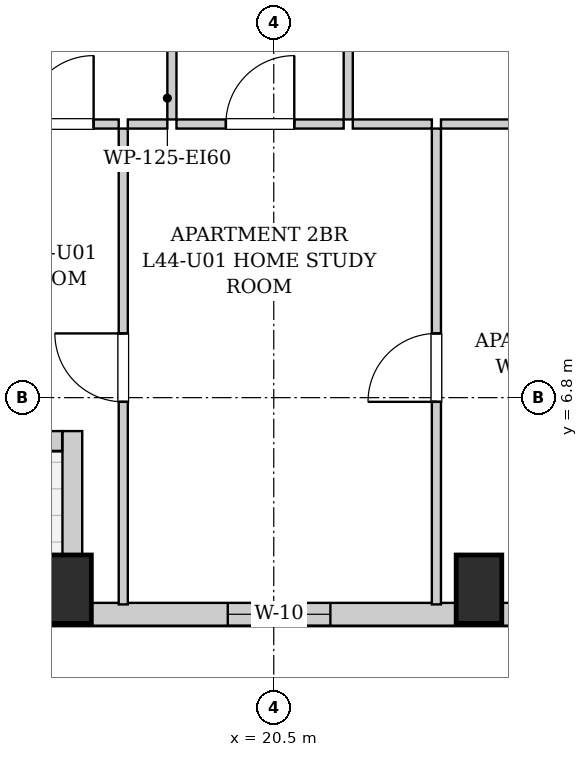
"""IFC4 building model, lengths in metres.
Left out: names, types, materials, properties, quantities, classifications, styles, units other than length and angle.
Written with IfcOpenShell. Run it as: python <this file> out.ifc"""

import sys

from ifc_helpers import new_model, si_unit, direction, frame, frame_2d, origin, origin_2d, place, context, subcontext, project, spatial, rectangle, extrude, element, fill, save


model = new_model("IFC4")
c1 = context("Model", 3, precision=1e-05, world=origin(), true_north=direction((0.0, 1.0)))
c2 = subcontext(c1, "Body", "Model", "MODEL_VIEW")
j1 = project(units=[si_unit("LENGTHUNIT", "METRE"), si_unit("PLANEANGLEUNIT", "RADIAN")], contexts=[c1])
p1 = place(None, origin())
s1 = spatial("IfcSite", under=j1, at=p1, CompositionType="ELEMENT")
p2 = place(p1, origin())
s2 = spatial("IfcBuilding", under=s1, at=p2, CompositionType="ELEMENT")
p3 = place(p2, frame((0.0, 0.0, 153.65)))
s3 = spatial("IfcBuildingStorey", under=s2, at=p3, CompositionType="ELEMENT", Elevation=153.65)
for number, where, z_axis, x_axis in (
    (1, (17.8, 4.28, 0.0), (0.0, 0.0, 1.0), (1.0, 0.0, 0.0)),
    (2, (23.2, 4.28, 0.0), (0.0, 0.0, 1.0), (1.0, 0.0, 0.0)),
):
    element("IfcColumn", number, at=place(p3, frame(where, z_axis=z_axis, x_axis=x_axis)), inside=s3, PredefinedType="COLUMN", context=c2, shape_type="SweptSolid", body=[
        extrude(rectangle(XDim=0.6, YDim=0.9, at=origin_2d()), origin(), (0.0, 0.0, 1.0), 3.25),
    ])
p4 = place(p3, frame((37.8, 3.95, 0.0), z_axis=(0.0, 0.0, 1.0), x_axis=(-1.0, 0.0, 0.0)))
e3 = element("IfcWall", 3, at=p4, inside=s3, PredefinedType="SOLIDWALL", context=c2, shape_type="SweptSolid", body=[
    extrude(rectangle(XDim=19.95, YDim=0.3, at=frame_2d((9.975, 0.0))), origin(), (0.0, 0.0, 1.0), 2.99),
])
p5 = place(p4, frame((16.555, 0.0, 0.55)))
e4 = element("IfcOpeningElement", 4, at=p5, cuts=e3, PredefinedType="OPENING", context=c2, shape_type="SweptSolid", body=[
    extrude(rectangle(XDim=1.35, YDim=1.2, at=frame_2d((0.675, 0.6))), frame((0.0, 0.16, 0.0), z_axis=(0.0, -1.0, 0.0), x_axis=(1.0, 0.0, 0.0)), (0.0, 0.0, 1.0), 0.32),
])
p6 = place(p4, frame((7.788, 0.0, 0.55)))
e5 = element("IfcOpeningElement", 5, at=p6, cuts=e3, PredefinedType="OPENING", context=c2, shape_type="SweptSolid", body=[
    extrude(rectangle(XDim=1.35, YDim=1.2, at=frame_2d((0.675, 0.6))), frame((0.0, 0.16, 0.0), z_axis=(0.0, -1.0, 0.0), x_axis=(1.0, 0.0, 0.0)), (0.0, 0.0, 1.0), 0.32),
])
p7 = place(p4, frame((5.06, 0.0, 0.55)))
e6 = element("IfcOpeningElement", 6, at=p7, cuts=e3, PredefinedType="OPENING", context=c2, shape_type="SweptSolid", body=[
    extrude(rectangle(XDim=1.35, YDim=1.2, at=frame_2d((0.675, 0.6))), frame((0.0, 0.16, 0.0), z_axis=(0.0, -1.0, 0.0), x_axis=(1.0, 0.0, 0.0)), (0.0, 0.0, 1.0), 0.32),
])
p8 = place(p3, frame((17.85, 3.96, 0.0), z_axis=(0.0, 0.0, 1.0), x_axis=(0.0, 1.0, 0.0)))
e7 = element("IfcWall", 7, at=p8, inside=s3, PredefinedType="SOLIDWALL", context=c2, shape_type="SweptSolid", body=[
    extrude(rectangle(XDim=2.4, YDim=0.26, at=frame_2d((1.2, 0.0))), origin(), (0.0, 0.0, 1.0), 2.442),
])
p9 = place(p3, frame((17.716, 6.23, 0.0), z_axis=(0.0, 0.0, 1.0), x_axis=(-1.0, 0.0, 0.0)))
e8 = element("IfcWall", 8, at=p9, inside=s3, PredefinedType="SOLIDWALL", context=c2, shape_type="SweptSolid", body=[
    extrude(rectangle(XDim=4.332, YDim=0.26, at=frame_2d((2.166, 0.0))), origin(), (0.0, 0.0, 1.0), 2.99),
])
p10 = place(p9, frame((1.616, 0.0, 0.0)))
e9 = element("IfcOpeningElement", 9, at=p10, cuts=e8, PredefinedType="OPENING", context=c2, shape_type="SweptSolid", body=[
    extrude(rectangle(XDim=1.1, YDim=2.0, at=frame_2d((0.55, 1.0))), frame((0.0, 0.14, 0.0), z_axis=(0.0, -1.0, 0.0), x_axis=(1.0, 0.0, 0.0)), (0.0, 0.0, 1.0), 0.28),
])
p11 = place(p9, frame((0.606, 0.0, 0.55)))
e10 = element("IfcOpeningElement", 10, at=p11, cuts=e8, PredefinedType="OPENING", context=c2, shape_type="SweptSolid", body=[
    extrude(rectangle(XDim=0.85, YDim=1.2, at=frame_2d((0.425, 0.6))), frame((0.0, 0.14, 0.0), z_axis=(0.0, -1.0, 0.0), x_axis=(1.0, 0.0, 0.0)), (0.0, 0.0, 1.0), 0.28),
])
p12 = place(p3, frame((19.16, 10.46, 0.0), z_axis=(0.0, 0.0, 1.0), x_axis=(0.0, 1.0, 0.0)))
e11 = element("IfcWall", 11, at=p12, inside=s3, PredefinedType="PARTITIONING", context=c2, shape_type="SweptSolid", body=[
    extrude(rectangle(XDim=2.85, YDim=0.12, at=frame_2d((1.425, 0.0))), origin(), (0.0, 0.0, 1.0), 2.99),
])
p13 = place(p12, frame((0.975, 0.0, 0.0)))
e12 = element("IfcOpeningElement", 12, at=p13, cuts=e11, PredefinedType="OPENING", context=c2, shape_type="SweptSolid", body=[
    extrude(rectangle(XDim=0.9, YDim=2.05, at=frame_2d((0.45, 1.025))), frame((0.0, 0.07, 0.0), z_axis=(0.0, -1.0, 0.0), x_axis=(1.0, 0.0, 0.0)), (0.0, 0.0, 1.0), 0.14),
])
p14 = place(p3, frame((16.9, 10.4, 0.0), z_axis=(0.0, 0.0, 1.0), x_axis=(1.0, 0.0, 0.0)))
e13 = element("IfcWall", 13, at=p14, inside=s3, PredefinedType="PARTITIONING", context=c2, shape_type="SweptSolid", body=[
    extrude(rectangle(XDim=1.56, YDim=0.12, at=frame_2d((0.78, 0.0))), origin(), (0.0, 0.0, 1.0), 2.99),
])
p15 = place(p14, frame((0.33, 0.0, 0.0)))
e14 = element("IfcOpeningElement", 14, at=p15, cuts=e13, PredefinedType="OPENING", context=c2, shape_type="SweptSolid", body=[
    extrude(rectangle(XDim=0.9, YDim=2.05, at=frame_2d((0.45, 1.025))), frame((0.0, 0.07, 0.0), z_axis=(0.0, -1.0, 0.0), x_axis=(1.0, 0.0, 0.0)), (0.0, 0.0, 1.0), 0.14),
])
p16 = place(p3, frame((18.58, 10.4, 0.0), z_axis=(0.0, 0.0, 1.0), x_axis=(1.0, 0.0, 0.0)))
e15 = element("IfcWall", 15, at=p16, inside=s3, PredefinedType="PARTITIONING", context=c2, shape_type="SweptSolid", body=[
    extrude(rectangle(XDim=0.52, YDim=0.12, at=frame_2d((0.26, 0.0))), origin(), (0.0, 0.0, 1.0), 2.99),
])
p17 = place(p3, frame((21.48, 10.46, 0.0), z_axis=(0.0, 0.0, 1.0), x_axis=(0.0, 1.0, 0.0)))
e16 = element("IfcWall", 16, at=p17, inside=s3, PredefinedType="PARTITIONING", context=c2, shape_type="SweptSolid", body=[
    extrude(rectangle(XDim=2.85, YDim=0.12, at=frame_2d((1.425, 0.0))), origin(), (0.0, 0.0, 1.0), 2.99),
])
p18 = place(p17, frame((0.975, 0.0, 0.0)))
e17 = element("IfcOpeningElement", 17, at=p18, cuts=e16, PredefinedType="OPENING", context=c2, shape_type="SweptSolid", body=[
    extrude(rectangle(XDim=0.9, YDim=2.05, at=frame_2d((0.45, 1.025))), frame((0.0, 0.07, 0.0), z_axis=(0.0, -1.0, 0.0), x_axis=(1.0, 0.0, 0.0)), (0.0, 0.0, 1.0), 0.14),
])
p19 = place(p3, frame((19.22, 10.4, 0.0), z_axis=(0.0, 0.0, 1.0), x_axis=(1.0, 0.0, 0.0)))
e18 = element("IfcWall", 18, at=p19, inside=s3, PredefinedType="PARTITIONING", context=c2, shape_type="SweptSolid", body=[
    extrude(rectangle(XDim=2.2, YDim=0.12, at=frame_2d((1.1, 0.0))), origin(), (0.0, 0.0, 1.0), 2.99),
])
p20 = place(p19, frame((0.65, 0.0, 0.0)))
e19 = element("IfcOpeningElement", 19, at=p20, cuts=e18, PredefinedType="OPENING", context=c2, shape_type="SweptSolid", body=[
    extrude(rectangle(XDim=0.9, YDim=2.05, at=frame_2d((0.45, 1.025))), frame((0.0, 0.07, 0.0), z_axis=(0.0, -1.0, 0.0), x_axis=(1.0, 0.0, 0.0)), (0.0, 0.0, 1.0), 0.14),
])
for number, where, z_axis, x_axis in (
    (20, (21.54, 10.4, 0.0), (0.0, 0.0, 1.0), (1.0, 0.0, 0.0)),
    (21, (22.7, 10.4, 0.0), (0.0, 0.0, 1.0), (1.0, 0.0, 0.0)),
):
    element("IfcWall", number, at=place(p3, frame(where, z_axis=z_axis, x_axis=x_axis)), inside=s3, PredefinedType="PARTITIONING", context=c2, shape_type="SweptSolid", body=[
        extrude(rectangle(XDim=1.04, YDim=0.12, at=frame_2d((0.52, 0.0))), origin(), (0.0, 0.0, 1.0), 2.99),
    ])
p21 = place(p3, frame((18.52, 4.08, 0.0), z_axis=(0.0, 0.0, 1.0), x_axis=(0.0, 1.0, 0.0)))
e22 = element("IfcWall", 22, at=p21, inside=s3, PredefinedType="PARTITIONING", context=c2, shape_type="SweptSolid", body=[
    extrude(rectangle(XDim=6.26, YDim=0.12, at=frame_2d((3.13, 0.0))), origin(), (0.0, 0.0, 1.0), 2.99),
])
p22 = place(p21, frame((2.665, 0.0, 0.0)))
e23 = element("IfcOpeningElement", 23, at=p22, cuts=e22, PredefinedType="OPENING", context=c2, shape_type="SweptSolid", body=[
    extrude(rectangle(XDim=0.9, YDim=2.05, at=frame_2d((0.45, 1.025))), frame((0.0, 0.07, 0.0), z_axis=(0.0, -1.0, 0.0), x_axis=(1.0, 0.0, 0.0)), (0.0, 0.0, 1.0), 0.14),
])
p23 = place(p3, frame((22.64, 4.08, 0.0), z_axis=(0.0, 0.0, 1.0), x_axis=(0.0, 1.0, 0.0)))
e24 = element("IfcWall", 24, at=p23, inside=s3, PredefinedType="PARTITIONING", context=c2, shape_type="SweptSolid", body=[
    extrude(rectangle(XDim=6.26, YDim=0.12, at=frame_2d((3.13, 0.0))), origin(), (0.0, 0.0, 1.0), 2.99),
])
p24 = place(p23, frame((2.665, 0.0, 0.0)))
e25 = element("IfcOpeningElement", 25, at=p24, cuts=e24, PredefinedType="OPENING", context=c2, shape_type="SweptSolid", body=[
    extrude(rectangle(XDim=0.9, YDim=2.05, at=frame_2d((0.45, 1.025))), frame((0.0, 0.07, 0.0), z_axis=(0.0, -1.0, 0.0), x_axis=(1.0, 0.0, 0.0)), (0.0, 0.0, 1.0), 0.14),
])
p25 = place(p15, origin())
e26 = element("IfcDoor", 26, at=p25, inside=s3, OperationType="SINGLE_SWING_RIGHT", PredefinedType="DOOR", context=c2, shape_type="SweptSolid", body=[
    extrude(rectangle(XDim=0.9, YDim=2.05, at=frame_2d((0.45, 1.025))), frame((0.0, 0.025, 0.0), z_axis=(0.0, -1.0, 0.0), x_axis=(1.0, 0.0, 0.0)), (0.0, 0.0, 1.0), 0.05),
])
fill(e14, e26)
p26 = place(p20, origin())
e27 = element("IfcDoor", 27, at=p26, inside=s3, OperationType="SINGLE_SWING_RIGHT", PredefinedType="DOOR", context=c2, shape_type="SweptSolid", body=[
    extrude(rectangle(XDim=0.9, YDim=2.05, at=frame_2d((0.45, 1.025))), frame((0.0, 0.025, 0.0), z_axis=(0.0, -1.0, 0.0), x_axis=(1.0, 0.0, 0.0)), (0.0, 0.0, 1.0), 0.05),
])
fill(e19, e27)
p27 = place(p22, origin())
e28 = element("IfcDoor", 28, at=p27, inside=s3, OperationType="SINGLE_SWING_RIGHT", PredefinedType="DOOR", context=c2, shape_type="SweptSolid", body=[
    extrude(rectangle(XDim=0.9, YDim=2.05, at=frame_2d((0.45, 1.025))), frame((0.0, 0.025, 0.0), z_axis=(0.0, -1.0, 0.0), x_axis=(1.0, 0.0, 0.0)), (0.0, 0.0, 1.0), 0.05),
])
fill(e23, e28)
p28 = place(p24, origin())
e29 = element("IfcDoor", 29, at=p28, inside=s3, OperationType="SINGLE_SWING_LEFT", PredefinedType="DOOR", context=c2, shape_type="SweptSolid", body=[
    extrude(rectangle(XDim=0.9, YDim=2.05, at=frame_2d((0.45, 1.025))), frame((0.0, 0.025, 0.0), z_axis=(0.0, -1.0, 0.0), x_axis=(1.0, 0.0, 0.0)), (0.0, 0.0, 1.0), 0.05),
])
fill(e25, e29)
p29 = place(p5, origin())
e30 = element("IfcWindow", 30, at=p29, inside=s3, PartitioningType="SINGLE_PANEL", PredefinedType="WINDOW", context=c2, shape_type="SweptSolid", body=[
    extrude(rectangle(XDim=1.35, YDim=1.2, at=frame_2d((0.675, 0.6))), frame((0.0, 0.03, 0.0), z_axis=(0.0, -1.0, 0.0), x_axis=(1.0, 0.0, 0.0)), (0.0, 0.0, 1.0), 0.06),
])
fill(e4, e30)
save(model, sys.argv[1])
